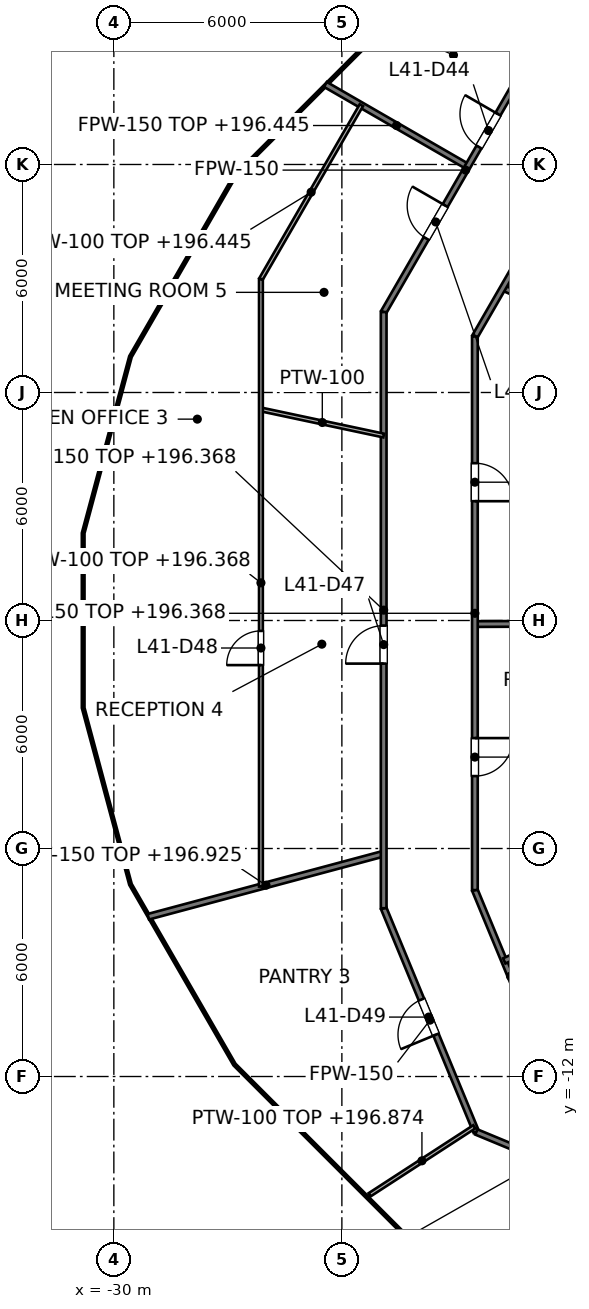
"""IFC4 building model, lengths in metres.
Left out: names, types, materials, properties, quantities, classifications, styles, units other than length and angle.
Written with IfcOpenShell. Run it as: python <this file> out.ifc"""

import sys

from ifc_helpers import new_model, si_unit, direction, frame, frame_2d, origin, place, context, subcontext, project, spatial, rectangle, extrude, element, fill, save


model = new_model("IFC4")
c1 = context("Model", 3, precision=1e-05, world=origin(), true_north=direction((0.0, 1.0)))
c2 = subcontext(c1, "Body", "Model", "MODEL_VIEW")
j1 = project(units=[si_unit("LENGTHUNIT", "METRE"), si_unit("PLANEANGLEUNIT", "RADIAN")], contexts=[c1])
p1 = place(None, origin())
s1 = spatial("IfcSite", under=j1, at=p1, CompositionType="ELEMENT")
p2 = place(p1, origin())
s2 = spatial("IfcBuilding", under=s1, at=p2, CompositionType="ELEMENT")
p3 = place(p2, frame((0.0, 0.0, 193.6)))
s3 = spatial("IfcBuildingStorey", under=s2, at=p3, CompositionType="ELEMENT", Elevation=193.6)
p4 = place(p3, frame((-22.9, -7.572, 0.0), z_axis=(0.0, 0.0, 1.0), x_axis=(0.382367581622, -0.924010298928, 0.0)))
e1 = element("IfcWall", 1, at=p4, inside=s3, PredefinedType="PARTITIONING", context=c2, shape_type="SweptSolid", body=[
    extrude(rectangle(XDim=6.374, YDim=0.15, at=frame_2d((3.187, 0.0))), origin(), (0.0, 0.0, 1.0), 2.777),
])
p5 = place(p4, frame((2.6, 0.0, 0.0)))
e2 = element("IfcOpeningElement", 2, at=p5, cuts=e1, PredefinedType="OPENING", context=c2, shape_type="SweptSolid", body=[
    extrude(rectangle(XDim=1.0, YDim=2.1, at=frame_2d((0.5, 1.05))), frame((0.0, 0.075, 0.0), z_axis=(0.0, -1.0, 0.0), x_axis=(1.0, 0.0, 0.0)), (0.0, 0.0, 1.0), 0.15),
])
p6 = place(p3, frame((-20.5, -7.095, 0.0), z_axis=(0.0, 0.0, 1.0), x_axis=(0.382364990163, -0.924011371303, 0.0)))
e3 = element("IfcWall", 3, at=p6, inside=s3, PredefinedType="PARTITIONING", context=c2, shape_type="SweptSolid", body=[
    extrude(rectangle(XDim=4.902, YDim=0.15, at=frame_2d((2.451, 0.0))), origin(), (0.0, 0.0, 1.0), 2.845),
])
p7 = place(p3, frame((-24.433, 14.106, 0.0), z_axis=(0.0, 0.0, 1.0), x_axis=(0.866048255864, -0.499960416948, 0.0)))
e4 = element("IfcWall", 4, at=p7, inside=s3, PredefinedType="PARTITIONING", context=c2, shape_type="SweptSolid", body=[
    extrude(rectangle(XDim=4.322, YDim=0.15, at=frame_2d((2.161, 0.0))), origin(), (0.0, 0.0, 1.0), 2.845),
])
p8 = place(p3, frame((-19.76, 8.755, 0.0), z_axis=(0.0, 0.0, 1.0), x_axis=(0.91424834547, -0.405154245695, 0.0)))
e5 = element("IfcWall", 5, at=p8, inside=s3, PredefinedType="PARTITIONING", context=c2, shape_type="SweptSolid", body=[
    extrude(rectangle(XDim=5.318, YDim=0.15, at=frame_2d((2.659, 0.0))), origin(), (0.0, 0.0, 1.0), 2.845),
])
p9 = place(p3, frame((-20.46, -13.46, 0.0), z_axis=(0.0, 0.0, 1.0), x_axis=(0.923801547606, -0.382871650349, 0.0)))
e6 = element("IfcWall", 6, at=p9, inside=s3, PredefinedType="PARTITIONING", context=c2, shape_type="SweptSolid", body=[
    extrude(rectangle(XDim=6.415, YDim=0.15, at=frame_2d((3.208, 0.0))), origin(), (0.0, 0.0, 1.0), 2.777),
])
p10 = place(p9, frame((2.707, 0.0, 0.0)))
e7 = element("IfcOpeningElement", 7, at=p10, cuts=e6, PredefinedType="OPENING", context=c2, shape_type="SweptSolid", body=[
    extrude(rectangle(XDim=1.0, YDim=2.1, at=frame_2d((0.5, 1.05))), frame((0.0, 0.075, 0.0), z_axis=(0.0, -1.0, 0.0), x_axis=(1.0, 0.0, 0.0)), (0.0, 0.0, 1.0), 0.15),
])
p11 = place(p3, frame((-20.5, -0.094, 0.0), z_axis=(0.0, 0.0, 1.0), x_axis=(0.999990148138, 0.004438876723, 0.0)))
e8 = element("IfcWall", 8, at=p11, inside=s3, PredefinedType="PARTITIONING", context=c2, shape_type="SweptSolid", body=[
    extrude(rectangle(XDim=5.5, YDim=0.15, at=frame_2d((2.75, 0.0))), origin(), (0.0, 0.0, 1.0), 2.768),
])
p12 = place(p3, frame((-29.094, -7.796, 0.0), z_axis=(0.0, 0.0, 1.0), x_axis=(0.965917630497, 0.258849630277, 0.0)))
e9 = element("IfcWall", 9, at=p12, inside=s3, PredefinedType="PARTITIONING", context=c2, shape_type="SweptSolid", body=[
    extrude(rectangle(XDim=6.413, YDim=0.15, at=frame_2d((3.206, 0.0))), origin(), (0.0, 0.0, 1.0), 3.325),
])
p13 = place(p3, frame((-19.728, -8.958, 0.0), z_axis=(0.0, 0.0, 1.0), x_axis=(0.910629511797, 0.413223779863, 0.0)))
e10 = element("IfcWall", 10, at=p13, inside=s3, PredefinedType="PARTITIONING", context=c2, shape_type="SweptSolid", body=[
    extrude(rectangle(XDim=5.368, YDim=0.15, at=frame_2d((2.684, 0.0))), origin(), (0.0, 0.0, 1.0), 3.7),
])
p14 = place(p3, frame((-20.5, 7.474, 0.0), z_axis=(0.0, 0.0, 1.0), x_axis=(0.499957196903, 0.866050114754, 0.0)))
e11 = element("IfcWall", 11, at=p14, inside=s3, PredefinedType="PARTITIONING", context=c2, shape_type="SweptSolid", body=[
    extrude(rectangle(XDim=6.602, YDim=0.15, at=frame_2d((3.301, 0.0))), origin(), (0.0, 0.0, 1.0), 2.777),
])
p15 = place(p14, frame((2.802, 0.0, 0.0)))
e12 = element("IfcOpeningElement", 12, at=p15, cuts=e11, PredefinedType="OPENING", context=c2, shape_type="SweptSolid", body=[
    extrude(rectangle(XDim=1.0, YDim=2.1, at=frame_2d((0.5, 1.05))), frame((0.0, 0.075, 0.0), z_axis=(0.0, -1.0, 0.0), x_axis=(1.0, 0.0, 0.0)), (0.0, 0.0, 1.0), 0.15),
])
p16 = place(p3, frame((-22.9, 8.117, 0.0), z_axis=(0.0, 0.0, 1.0), x_axis=(0.499950307977, 0.866054091587, 0.0)))
e13 = element("IfcWall", 13, at=p16, inside=s3, PredefinedType="PARTITIONING", context=c2, shape_type="SweptSolid", body=[
    extrude(rectangle(XDim=8.626, YDim=0.15, at=frame_2d((4.313, 0.0))), origin(), (0.0, 0.0, 1.0), 2.777),
])
p17 = place(p16, frame((5.015, 0.0, 0.0)))
e14 = element("IfcOpeningElement", 14, at=p17, cuts=e13, PredefinedType="OPENING", context=c2, shape_type="SweptSolid", body=[
    extrude(rectangle(XDim=1.0, YDim=2.1, at=frame_2d((0.5, 1.05))), frame((0.0, 0.075, 0.0), z_axis=(0.0, -1.0, 0.0), x_axis=(1.0, 0.0, 0.0)), (0.0, 0.0, 1.0), 0.15),
])
p18 = place(p16, frame((2.237, 0.0, 0.0)))
e15 = element("IfcOpeningElement", 15, at=p18, cuts=e13, PredefinedType="OPENING", context=c2, shape_type="SweptSolid", body=[
    extrude(rectangle(XDim=1.0, YDim=2.1, at=frame_2d((0.5, 1.05))), frame((0.0, 0.075, 0.0), z_axis=(0.0, -1.0, 0.0), x_axis=(1.0, 0.0, 0.0)), (0.0, 0.0, 1.0), 0.15),
])
p19 = place(p3, frame((-20.5, -7.095, 0.0), z_axis=(0.0, 0.0, 1.0), x_axis=(0.0, 1.0, 0.0)))
e16 = element("IfcWall", 16, at=p19, inside=s3, PredefinedType="PARTITIONING", context=c2, shape_type="SweptSolid", body=[
    extrude(rectangle(XDim=14.569, YDim=0.15, at=frame_2d((7.285, 0.0))), origin(), (0.0, 0.0, 1.0), 2.768),
])
p20 = place(p19, frame((10.234, 0.0, 0.0)))
e17 = element("IfcOpeningElement", 17, at=p20, cuts=e16, PredefinedType="OPENING", context=c2, shape_type="SweptSolid", body=[
    extrude(rectangle(XDim=1.0, YDim=2.1, at=frame_2d((0.5, 1.05))), frame((0.0, 0.075, 0.0), z_axis=(0.0, -1.0, 0.0), x_axis=(1.0, 0.0, 0.0)), (0.0, 0.0, 1.0), 0.15),
])
p21 = place(p19, frame((3.0, 0.0, 0.0)))
e18 = element("IfcOpeningElement", 18, at=p21, cuts=e16, PredefinedType="OPENING", context=c2, shape_type="SweptSolid", body=[
    extrude(rectangle(XDim=1.0, YDim=2.1, at=frame_2d((0.5, 1.05))), frame((0.0, 0.075, 0.0), z_axis=(0.0, -1.0, 0.0), x_axis=(1.0, 0.0, 0.0)), (0.0, 0.0, 1.0), 0.15),
])
p22 = place(p3, frame((-22.9, -7.572, 0.0), z_axis=(0.0, 0.0, 1.0), x_axis=(0.0, 1.0, 0.0)))
e19 = element("IfcWall", 19, at=p22, inside=s3, PredefinedType="PARTITIONING", context=c2, shape_type="SweptSolid", body=[
    extrude(rectangle(XDim=15.689, YDim=0.15, at=frame_2d((7.844, 0.0))), origin(), (0.0, 0.0, 1.0), 2.768),
])
p23 = place(p22, frame((6.438, 0.0, 0.0)))
e20 = element("IfcOpeningElement", 20, at=p23, cuts=e19, PredefinedType="OPENING", context=c2, shape_type="SweptSolid", body=[
    extrude(rectangle(XDim=1.0, YDim=2.1, at=frame_2d((0.5, 1.05))), frame((0.0, 0.075, 0.0), z_axis=(0.0, -1.0, 0.0), x_axis=(1.0, 0.0, 0.0)), (0.0, 0.0, 1.0), 0.15),
])
p24 = place(p3, frame((-26.13, 5.554, 0.0), z_axis=(0.0, 0.0, 1.0), x_axis=(0.978119374933, -0.208044438478, 0.0)))
e21 = element("IfcWall", 21, at=p24, inside=s3, PredefinedType="PARTITIONING", context=c2, shape_type="SweptSolid", body=[
    extrude(rectangle(XDim=3.302, YDim=0.1, at=frame_2d((1.651, 0.0))), origin(), (0.0, 0.0, 1.0), 3.7),
])
p25 = place(p3, frame((-23.271, -15.113, 0.0), z_axis=(0.0, 0.0, 1.0), x_axis=(0.83866769183, 0.544643463819, 0.0)))
e22 = element("IfcWall", 22, at=p25, inside=s3, PredefinedType="PARTITIONING", context=c2, shape_type="SweptSolid", body=[
    extrude(rectangle(XDim=3.285, YDim=0.1, at=frame_2d((1.643, 0.0))), origin(), (0.0, 0.0, 1.0), 3.273),
])
p26 = place(p3, frame((-26.13, 8.983, 0.0), z_axis=(0.0, 0.0, 1.0), x_axis=(0.500063643593, 0.865988656021, 0.0)))
e23 = element("IfcWall", 23, at=p26, inside=s3, PredefinedType="PARTITIONING", context=c2, shape_type="SweptSolid", body=[
    extrude(rectangle(XDim=5.285, YDim=0.1, at=frame_2d((2.643, 0.0))), origin(), (0.0, 0.0, 1.0), 2.845),
])
p27 = place(p3, frame((-26.13, -7.002, 0.0), z_axis=(0.0, 0.0, 1.0), x_axis=(0.0, 1.0, 0.0)))
e24 = element("IfcWall", 24, at=p27, inside=s3, PredefinedType="PARTITIONING", context=c2, shape_type="SweptSolid", body=[
    extrude(rectangle(XDim=15.985, YDim=0.1, at=frame_2d((7.992, 0.0))), origin(), (0.0, 0.0, 1.0), 2.768),
])
p28 = place(p27, frame((5.828, 0.0, 0.0)))
e25 = element("IfcOpeningElement", 25, at=p28, cuts=e24, PredefinedType="OPENING", context=c2, shape_type="SweptSolid", body=[
    extrude(rectangle(XDim=0.9, YDim=2.1, at=frame_2d((0.45, 1.05))), frame((0.0, 0.05, 0.0), z_axis=(0.0, -1.0, 0.0), x_axis=(1.0, 0.0, 0.0)), (0.0, 0.0, 1.0), 0.1),
])
p29 = place(p20, origin())
e26 = element("IfcDoor", 26, at=p29, inside=s3, OperationType="SINGLE_SWING_LEFT", PredefinedType="DOOR", context=c2, shape_type="SweptSolid", body=[
    extrude(rectangle(XDim=1.0, YDim=2.1, at=frame_2d((0.5, 1.05))), frame((0.0, 0.025, 0.0), z_axis=(0.0, -1.0, 0.0), x_axis=(1.0, 0.0, 0.0)), (0.0, 0.0, 1.0), 0.05),
])
fill(e17, e26)
p30 = place(p21, origin())
e27 = element("IfcDoor", 27, at=p30, inside=s3, OperationType="SINGLE_SWING_RIGHT", PredefinedType="DOOR", context=c2, shape_type="SweptSolid", body=[
    extrude(rectangle(XDim=1.0, YDim=2.1, at=frame_2d((0.5, 1.05))), frame((0.0, 0.025, 0.0), z_axis=(0.0, -1.0, 0.0), x_axis=(1.0, 0.0, 0.0)), (0.0, 0.0, 1.0), 0.05),
])
fill(e18, e27)
p31 = place(p17, origin())
e28 = element("IfcDoor", 28, at=p31, inside=s3, OperationType="SINGLE_SWING_RIGHT", PredefinedType="DOOR", context=c2, shape_type="SweptSolid", body=[
    extrude(rectangle(XDim=1.0, YDim=2.1, at=frame_2d((0.5, 1.05))), frame((0.0, 0.025, 0.0), z_axis=(0.0, -1.0, 0.0), x_axis=(1.0, 0.0, 0.0)), (0.0, 0.0, 1.0), 0.05),
])
fill(e14, e28)
p32 = place(p18, origin())
e29 = element("IfcDoor", 29, at=p32, inside=s3, OperationType="SINGLE_SWING_RIGHT", PredefinedType="DOOR", context=c2, shape_type="SweptSolid", body=[
    extrude(rectangle(XDim=1.0, YDim=2.1, at=frame_2d((0.5, 1.05))), frame((0.0, 0.025, 0.0), z_axis=(0.0, -1.0, 0.0), x_axis=(1.0, 0.0, 0.0)), (0.0, 0.0, 1.0), 0.05),
])
fill(e15, e29)
p33 = place(p23, origin())
e30 = element("IfcDoor", 30, at=p33, inside=s3, OperationType="SINGLE_SWING_LEFT", PredefinedType="DOOR", context=c2, shape_type="SweptSolid", body=[
    extrude(rectangle(XDim=1.0, YDim=2.1, at=frame_2d((0.5, 1.05))), frame((0.0, 0.025, 0.0), z_axis=(0.0, -1.0, 0.0), x_axis=(1.0, 0.0, 0.0)), (0.0, 0.0, 1.0), 0.05),
])
fill(e20, e30)
p34 = place(p28, origin())
e31 = element("IfcDoor", 31, at=p34, inside=s3, OperationType="SINGLE_SWING_LEFT", PredefinedType="DOOR", context=c2, shape_type="SweptSolid", body=[
    extrude(rectangle(XDim=0.9, YDim=2.1, at=frame_2d((0.45, 1.05))), frame((0.0, 0.025, 0.0), z_axis=(0.0, -1.0, 0.0), x_axis=(1.0, 0.0, 0.0)), (0.0, 0.0, 1.0), 0.05),
])
fill(e25, e31)
p35 = place(p5, origin())
e32 = element("IfcDoor", 32, at=p35, inside=s3, OperationType="SINGLE_SWING_RIGHT", PredefinedType="DOOR", context=c2, shape_type="SweptSolid", body=[
    extrude(rectangle(XDim=1.0, YDim=2.1, at=frame_2d((0.5, 1.05))), frame((0.0, 0.025, 0.0), z_axis=(0.0, -1.0, 0.0), x_axis=(1.0, 0.0, 0.0)), (0.0, 0.0, 1.0), 0.05),
])
fill(e2, e32)
save(model, sys.argv[1])
